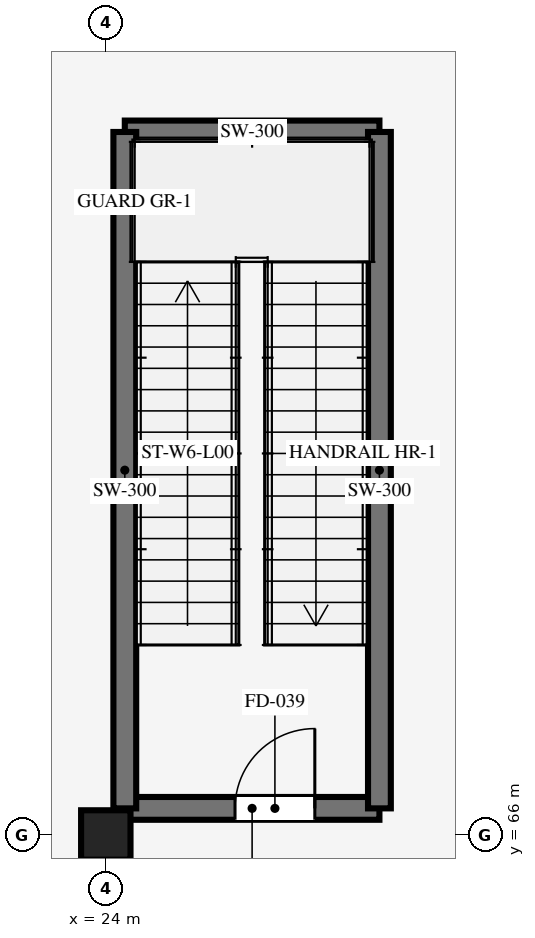
"""IFC4 building model, lengths in metres.
Left out: names, types, materials, properties, quantities, classifications, styles, units other than length and angle.
Written with IfcOpenShell. Run it as: python <this file> out.ifc"""

import sys

from ifc_helpers import new_model, si_unit, direction, frame, frame_2d, origin, origin_2d, place, context, subcontext, project, spatial, rectangle, extrude, element, fill, save


model = new_model("IFC4")
c1 = context("Model", 3, precision=1e-05, world=origin(), true_north=direction((0.0, 1.0)))
c2 = subcontext(c1, "Body", "Model", "MODEL_VIEW")
j1 = project(units=[si_unit("LENGTHUNIT", "METRE"), si_unit("PLANEANGLEUNIT", "RADIAN")], contexts=[c1])
p1 = place(None, origin())
s1 = spatial("IfcSite", under=j1, at=p1, CompositionType="ELEMENT")
p2 = place(p1, origin())
s2 = spatial("IfcBuilding", under=s1, at=p2, CompositionType="ELEMENT")
p3 = place(p2, origin())
s3 = spatial("IfcBuildingStorey", under=s2, at=p3, CompositionType="ELEMENT", Elevation=0.0)
p4 = place(p3, frame((24.0, 66.0, 0.0), z_axis=(0.0, 0.0, 1.0), x_axis=(1.0, 0.0, 0.0)))
e1 = element("IfcColumn", 1, at=p4, inside=s3, PredefinedType="COLUMN", context=c2, shape_type="SweptSolid", body=[
    extrude(rectangle(XDim=0.65, YDim=0.65, at=origin_2d()), origin(), (0.0, 0.0, 1.0), 5.24),
])
p5 = place(p3, frame((24.25, 66.35, 0.0), z_axis=(0.0, 0.0, 1.0), x_axis=(1.0, 0.0, 0.0)))
e2 = element("IfcWall", 2, at=p5, inside=s3, PredefinedType="SHEAR", context=c2, shape_type="SweptSolid", body=[
    extrude(rectangle(XDim=3.35, YDim=0.3, at=frame_2d((1.675, 0.0))), origin(), (0.0, 0.0, 1.0), 5.38),
])
p6 = place(p5, frame((1.45, 0.0, 0.0)))
e3 = element("IfcOpeningElement", 3, at=p6, cuts=e2, PredefinedType="OPENING", context=c2, shape_type="SweptSolid", body=[
    extrude(rectangle(XDim=1.05, YDim=2.15, at=frame_2d((0.525, 1.075))), frame((0.0, 0.16, 0.0), z_axis=(0.0, -1.0, 0.0), x_axis=(1.0, 0.0, 0.0)), (0.0, 0.0, 1.0), 0.32),
])
p7 = place(p3, frame((24.25, 75.25, 0.0), z_axis=(0.0, 0.0, 1.0), x_axis=(1.0, 0.0, 0.0)))
e4 = element("IfcWall", 4, at=p7, inside=s3, PredefinedType="SHEAR", context=c2, shape_type="SweptSolid", body=[
    extrude(rectangle(XDim=3.35, YDim=0.3, at=frame_2d((1.675, 0.0))), origin(), (0.0, 0.0, 1.0), 5.38),
])
for number, where, z_axis, x_axis in (
    (5, (24.25, 66.35, 0.0), (0.0, 0.0, 1.0), (0.0, 1.0, 0.0)),
    (6, (27.6, 66.35, 0.0), (0.0, 0.0, 1.0), (0.0, 1.0, 0.0)),
):
    element("IfcWall", number, at=place(p3, frame(where, z_axis=z_axis, x_axis=x_axis)), inside=s3, PredefinedType="SHEAR", context=c2, shape_type="SweptSolid", body=[
        extrude(rectangle(XDim=8.9, YDim=0.3, at=frame_2d((4.45, 0.0))), origin(), (0.0, 0.0, 1.0), 5.38),
    ])
p8 = place(p6, origin())
e7 = element("IfcDoor", 7, at=p8, inside=s3, OperationType="SINGLE_SWING_RIGHT", PredefinedType="DOOR", context=c2, shape_type="SweptSolid", body=[
    extrude(rectangle(XDim=1.05, YDim=2.15, at=frame_2d((0.525, 1.075))), frame((0.0, 0.025, 0.0), z_axis=(0.0, -1.0, 0.0), x_axis=(1.0, 0.0, 0.0)), (0.0, 0.0, 1.0), 0.05),
])
fill(e3, e7)
save(model, sys.argv[1])
